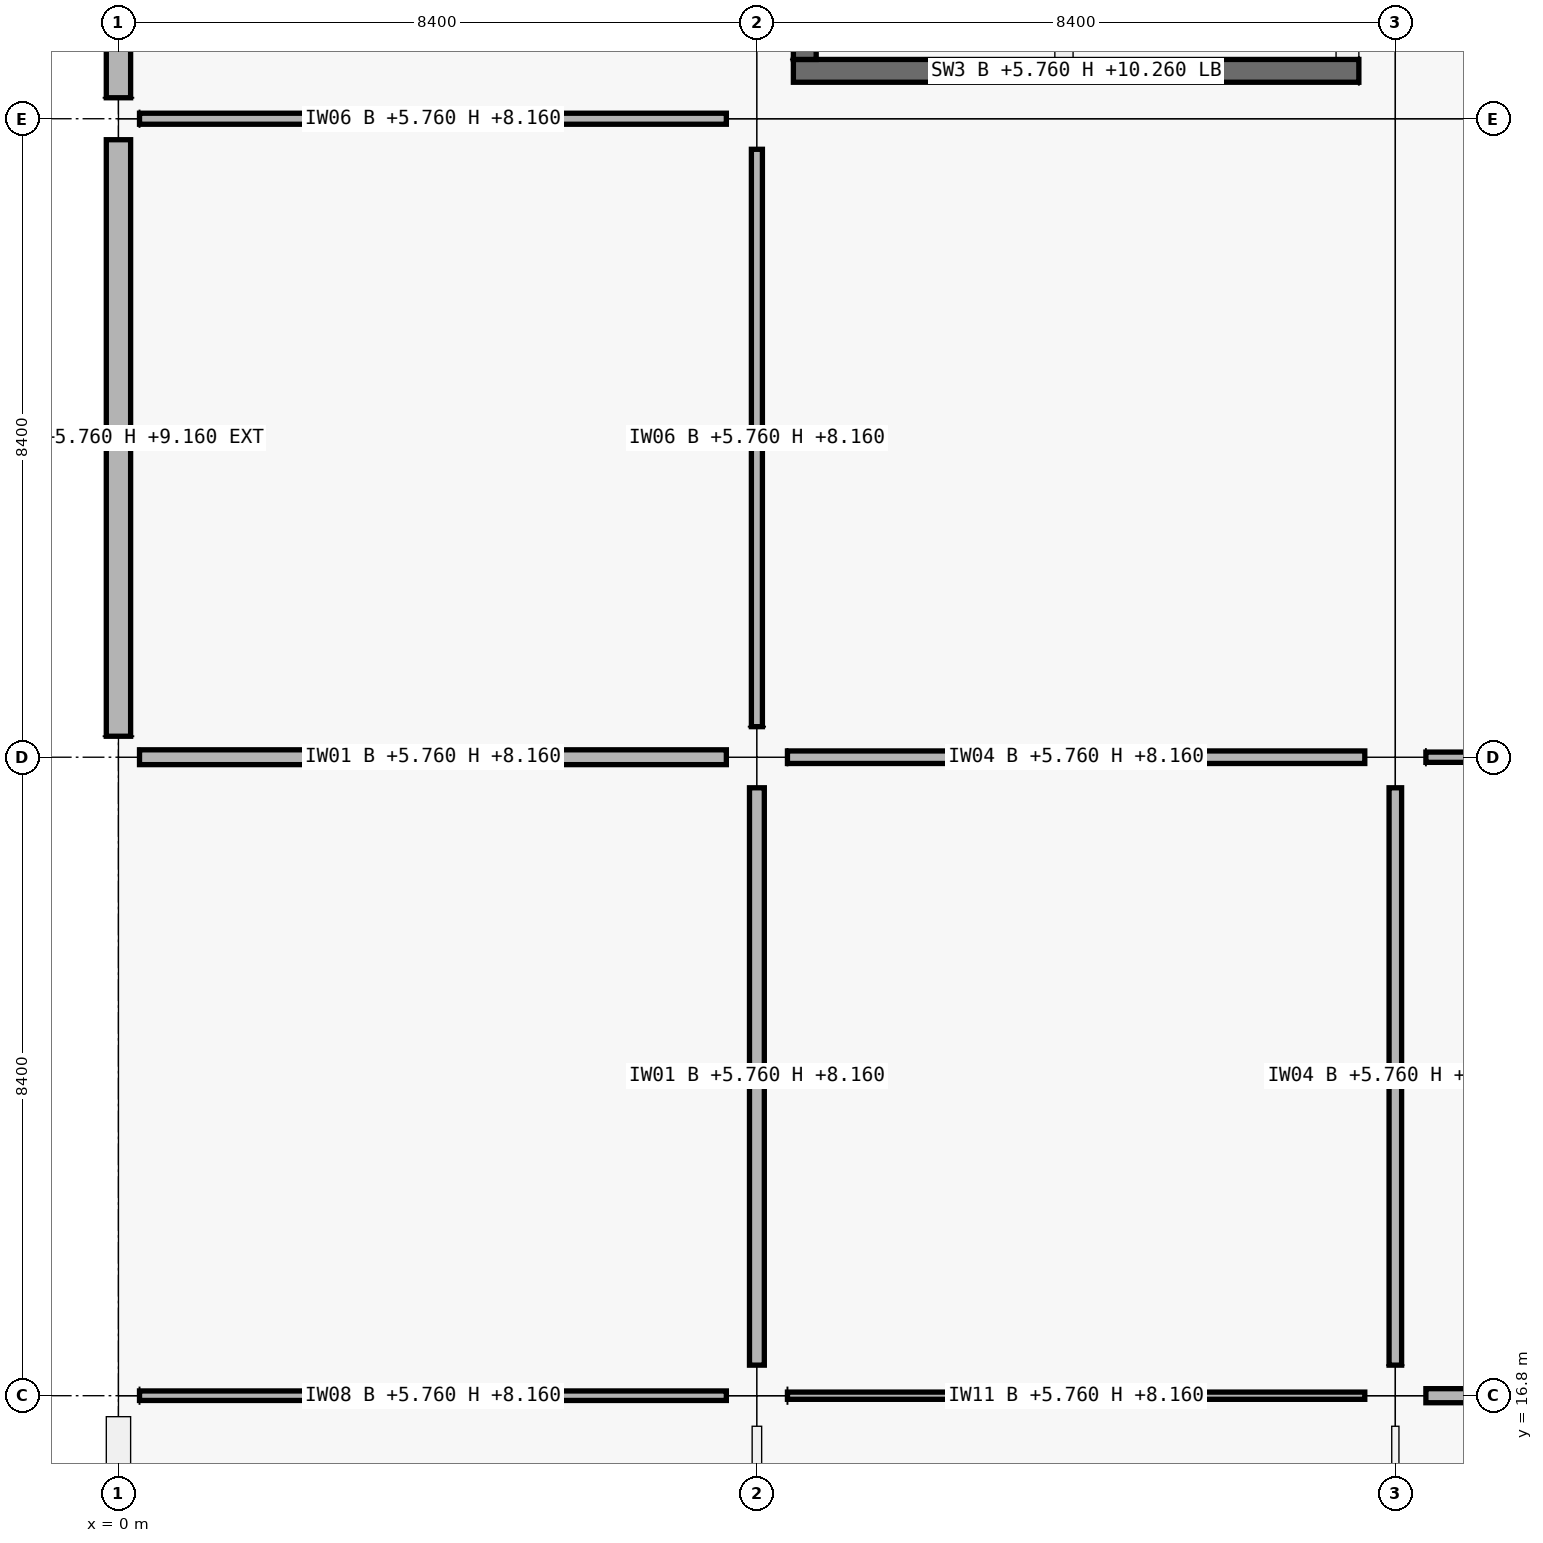
"""IFC4 building model, lengths in metres.
Left out: names, types, materials, properties, quantities, classifications, styles, units other than length and angle.
Written with IfcOpenShell. Run it as: python <this file> out.ifc"""

import sys

from ifc_helpers import new_model, si_unit, direction, frame, frame_2d, origin, origin_2d, place, context, subcontext, project, spatial, rectangle, extrude, element, fill, save


model = new_model("IFC4")
c1 = context("Model", 3, precision=1e-05, world=origin(), true_north=direction((0.0, 1.0)))
c2 = subcontext(c1, "Body", "Model", "MODEL_VIEW")
j1 = project(units=[si_unit("LENGTHUNIT", "METRE"), si_unit("PLANEANGLEUNIT", "RADIAN")], contexts=[c1])
p1 = place(None, origin())
s1 = spatial("IfcSite", under=j1, at=p1, CompositionType="ELEMENT")
p2 = place(p1, origin())
s2 = spatial("IfcBuilding", under=s1, at=p2, CompositionType="ELEMENT")
p3 = place(p2, frame((0.0, 0.0, 5.76)))
s3 = spatial("IfcBuildingStorey", under=s2, at=p3, CompositionType="ELEMENT", Elevation=5.76)
for number, where, z_axis, x_axis in (
    (1, (0.0, 16.8, 0.0), (0.0, 0.0, 1.0), (1.0, 0.0, 0.0)),
    (2, (0.0, 25.2, 0.0), (0.0, 0.0, 1.0), (1.0, 0.0, 0.0)),
    (3, (0.0, 33.6, 0.0), (0.0, 0.0, 1.0), (1.0, 0.0, 0.0)),
):
    element("IfcColumn", number, at=place(p3, frame(where, z_axis=z_axis, x_axis=x_axis)), inside=s3, PredefinedType="COLUMN", context=c2, shape_type="SweptSolid", body=[
        extrude(rectangle(XDim=0.55, YDim=0.55, at=origin_2d()), origin(), (0.0, 0.0, 1.0), 4.2),
    ])
for number, where, z_axis, x_axis in (
    (4, (8.4, 16.8, 0.0), (0.0, 0.0, 1.0), (1.0, 0.0, 0.0)),
    (5, (8.4, 25.2, 0.0), (0.0, 0.0, 1.0), (1.0, 0.0, 0.0)),
    (6, (8.4, 33.6, 0.0), (0.0, 0.0, 1.0), (1.0, 0.0, 0.0)),
    (7, (16.8, 16.8, 0.0), (0.0, 0.0, 1.0), (1.0, 0.0, 0.0)),
    (8, (16.8, 25.2, 0.0), (0.0, 0.0, 1.0), (1.0, 0.0, 0.0)),
    (9, (16.8, 33.6, 0.0), (0.0, 0.0, 1.0), (1.0, 0.0, 0.0)),
):
    element("IfcColumn", number, at=place(p3, frame(where, z_axis=z_axis, x_axis=x_axis)), inside=s3, PredefinedType="COLUMN", context=c2, shape_type="SweptSolid", body=[
        extrude(rectangle(XDim=0.8, YDim=0.8, at=origin_2d()), origin(), (0.0, 0.0, 1.0), 4.5),
    ])
p4 = place(p3, frame((0.0, 8.676, 0.0), z_axis=(0.0, 0.0, 1.0), x_axis=(0.0, 1.0, 0.0)))
e10 = element("IfcWall", 10, at=p4, inside=s3, PredefinedType="SOLIDWALL", context=c2, shape_type="SweptSolid", body=[
    extrude(rectangle(XDim=7.848, YDim=0.32, at=frame_2d((3.924, 0.0))), origin(), (0.0, 0.0, 1.0), 3.4),
])
p5 = place(p4, frame((2.974, 0.0, 0.9)))
e11 = element("IfcOpeningElement", 11, at=p5, cuts=e10, PredefinedType="OPENING", context=c2, shape_type="SweptSolid", body=[
    extrude(rectangle(XDim=1.9, YDim=1.75, at=frame_2d((0.95, 0.875))), frame((0.0, 0.16, 0.0), z_axis=(0.0, -1.0, 0.0), x_axis=(1.0, 0.0, 0.0)), (0.0, 0.0, 1.0), 0.32),
])
p6 = place(p3, frame((0.0, 25.476, 0.0), z_axis=(0.0, 0.0, 1.0), x_axis=(0.0, 1.0, 0.0)))
e12 = element("IfcWall", 12, at=p6, inside=s3, PredefinedType="SOLIDWALL", context=c2, shape_type="SweptSolid", body=[
    extrude(rectangle(XDim=7.848, YDim=0.32, at=frame_2d((3.924, 0.0))), origin(), (0.0, 0.0, 1.0), 3.4),
])
p7 = place(p6, frame((3.224, 0.0, 0.9)))
e13 = element("IfcOpeningElement", 13, at=p7, cuts=e12, PredefinedType="OPENING", context=c2, shape_type="SweptSolid", body=[
    extrude(rectangle(XDim=1.4, YDim=1.75, at=frame_2d((0.7, 0.875))), frame((0.0, 0.16, 0.0), z_axis=(0.0, -1.0, 0.0), x_axis=(1.0, 0.0, 0.0)), (0.0, 0.0, 1.0), 0.32),
])
p8 = place(p3, frame((0.0, 33.876, 0.0), z_axis=(0.0, 0.0, 1.0), x_axis=(0.0, 1.0, 0.0)))
e14 = element("IfcWall", 14, at=p8, inside=s3, PredefinedType="SOLIDWALL", context=c2, shape_type="SweptSolid", body=[
    extrude(rectangle(XDim=7.848, YDim=0.32, at=frame_2d((3.924, 0.0))), origin(), (0.0, 0.0, 1.0), 3.4),
])
p9 = place(p8, frame((2.324, 0.0, 0.9)))
e15 = element("IfcOpeningElement", 15, at=p9, cuts=e14, PredefinedType="OPENING", context=c2, shape_type="SweptSolid", body=[
    extrude(rectangle(XDim=3.2, YDim=1.75, at=frame_2d((1.6, 0.875))), frame((0.0, 0.16, 0.0), z_axis=(0.0, -1.0, 0.0), x_axis=(1.0, 0.0, 0.0)), (0.0, 0.0, 1.0), 0.32),
])
p10 = place(p3, frame((16.32, 34.23, 0.0), z_axis=(0.0, 0.0, 1.0), x_axis=(-1.0, 0.0, 0.0)))
e16 = element("IfcWall", 16, at=p10, inside=s3, PredefinedType="SHEAR", context=c2, shape_type="SweptSolid", body=[
    extrude(rectangle(XDim=7.44, YDim=0.3, at=frame_2d((3.72, 0.0))), origin(), (0.0, 0.0, 1.0), 4.5),
])
p11 = place(p10, frame((1.28, 0.0, 0.0)))
e17 = element("IfcOpeningElement", 17, at=p11, cuts=e16, PredefinedType="OPENING", context=c2, shape_type="SweptSolid", body=[
    extrude(rectangle(XDim=1.5, YDim=2.15, at=frame_2d((0.75, 1.075))), frame((0.0, 0.15, 0.0), z_axis=(0.0, -1.0, 0.0), x_axis=(1.0, 0.0, 0.0)), (0.0, 0.0, 1.0), 0.3),
])
for number, where, z_axis, x_axis in (
    (18, (9.03, 34.38, 0.0), (0.0, 0.0, 1.0), (0.0, 1.0, 0.0)),
    (19, (16.17, 41.22, 0.0), (0.0, 0.0, 1.0), (0.0, -1.0, 0.0)),
):
    element("IfcWall", number, at=place(p3, frame(where, z_axis=z_axis, x_axis=x_axis)), inside=s3, PredefinedType="SHEAR", context=c2, shape_type="SweptSolid", body=[
        extrude(rectangle(XDim=6.84, YDim=0.3, at=frame_2d((3.42, 0.0))), origin(), (0.0, 0.0, 1.0), 4.5),
    ])
p12 = place(p3, frame((12.44, 34.38, 0.0), z_axis=(0.0, 0.0, 1.0), x_axis=(0.0, 1.0, 0.0)))
e20 = element("IfcWall", 20, at=p12, inside=s3, PredefinedType="SHEAR", context=c2, shape_type="SweptSolid", body=[
    extrude(rectangle(XDim=6.84, YDim=0.24, at=frame_2d((3.42, 0.0))), origin(), (0.0, 0.0, 1.0), 4.5),
])
p13 = place(p12, frame((0.12, 0.0, 0.0)))
e21 = element("IfcOpeningElement", 21, at=p13, cuts=e20, PredefinedType="OPENING", context=c2, shape_type="SweptSolid", body=[
    extrude(rectangle(XDim=1.0, YDim=2.15, at=frame_2d((0.5, 1.075))), frame((0.0, 0.12, 0.0), z_axis=(0.0, -1.0, 0.0), x_axis=(1.0, 0.0, 0.0)), (0.0, 0.0, 1.0), 0.24),
])
p14 = place(p3, frame((0.277, 16.8, 0.0), z_axis=(0.0, 0.0, 1.0), x_axis=(1.0, 0.0, 0.0)))
e22 = element("IfcWall", 22, at=p14, inside=s3, PredefinedType="PARTITIONING", context=c2, shape_type="SweptSolid", body=[
    extrude(rectangle(XDim=7.721, YDim=0.125, at=frame_2d((3.86, 0.0))), origin(), (0.0, 0.0, 1.0), 2.4),
])
p15 = place(p14, frame((3.33, 0.0, 0.0)))
e23 = element("IfcOpeningElement", 23, at=p15, cuts=e22, PredefinedType="OPENING", context=c2, shape_type="SweptSolid", body=[
    extrude(rectangle(XDim=1.06, YDim=2.22, at=frame_2d((0.53, 1.11))), frame((0.0, 0.062, 0.0), z_axis=(0.0, -1.0, 0.0), x_axis=(1.0, 0.0, 0.0)), (0.0, 0.0, 1.0), 0.125),
])
p16 = place(p3, frame((0.277, 25.2, 0.0), z_axis=(0.0, 0.0, 1.0), x_axis=(1.0, 0.0, 0.0)))
e24 = element("IfcWall", 24, at=p16, inside=s3, PredefinedType="PARTITIONING", context=c2, shape_type="SweptSolid", body=[
    extrude(rectangle(XDim=7.721, YDim=0.195, at=frame_2d((3.86, 0.0))), origin(), (0.0, 0.0, 1.0), 2.4),
])
p17 = place(p16, frame((3.396, 0.0, 0.0)))
e25 = element("IfcOpeningElement", 25, at=p17, cuts=e24, PredefinedType="OPENING", context=c2, shape_type="SweptSolid", body=[
    extrude(rectangle(XDim=0.93, YDim=2.12, at=frame_2d((0.465, 1.06))), frame((0.0, 0.098, 0.0), z_axis=(0.0, -1.0, 0.0), x_axis=(1.0, 0.0, 0.0)), (0.0, 0.0, 1.0), 0.195),
])
p18 = place(p3, frame((0.277, 33.6, 0.0), z_axis=(0.0, 0.0, 1.0), x_axis=(1.0, 0.0, 0.0)))
e26 = element("IfcWall", 26, at=p18, inside=s3, PredefinedType="PARTITIONING", context=c2, shape_type="SweptSolid", body=[
    extrude(rectangle(XDim=7.721, YDim=0.145, at=frame_2d((3.86, 0.0))), origin(), (0.0, 0.0, 1.0), 2.4),
])
p19 = place(p18, frame((3.341, 0.0, 0.0)))
e27 = element("IfcOpeningElement", 27, at=p19, cuts=e26, PredefinedType="OPENING", context=c2, shape_type="SweptSolid", body=[
    extrude(rectangle(XDim=1.04, YDim=2.2, at=frame_2d((0.52, 1.1))), frame((0.0, 0.073, 0.0), z_axis=(0.0, -1.0, 0.0), x_axis=(1.0, 0.0, 0.0)), (0.0, 0.0, 1.0), 0.145),
])
p20 = place(p3, frame((8.802, 16.8, 0.0), z_axis=(0.0, 0.0, 1.0), x_axis=(1.0, 0.0, 0.0)))
e28 = element("IfcWall", 28, at=p20, inside=s3, PredefinedType="PARTITIONING", context=c2, shape_type="SweptSolid", body=[
    extrude(rectangle(XDim=7.596, YDim=0.095, at=frame_2d((3.798, 0.0))), origin(), (0.0, 0.0, 1.0), 2.4),
])
p21 = place(p20, frame((3.258, 0.0, 0.0)))
e29 = element("IfcOpeningElement", 29, at=p21, cuts=e28, PredefinedType="OPENING", context=c2, shape_type="SweptSolid", body=[
    extrude(rectangle(XDim=1.08, YDim=2.22, at=frame_2d((0.54, 1.11))), frame((0.0, 0.047, 0.0), z_axis=(0.0, -1.0, 0.0), x_axis=(1.0, 0.0, 0.0)), (0.0, 0.0, 1.0), 0.095),
])
p22 = place(p3, frame((8.802, 25.2, 0.0), z_axis=(0.0, 0.0, 1.0), x_axis=(1.0, 0.0, 0.0)))
e30 = element("IfcWall", 30, at=p22, inside=s3, PredefinedType="PARTITIONING", context=c2, shape_type="SweptSolid", body=[
    extrude(rectangle(XDim=7.596, YDim=0.165, at=frame_2d((3.798, 0.0))), origin(), (0.0, 0.0, 1.0), 2.4),
])
p23 = place(p22, frame((3.318, 0.0, 0.0)))
e31 = element("IfcOpeningElement", 31, at=p23, cuts=e30, PredefinedType="OPENING", context=c2, shape_type="SweptSolid", body=[
    extrude(rectangle(XDim=0.96, YDim=2.18, at=frame_2d((0.48, 1.09))), frame((0.0, 0.083, 0.0), z_axis=(0.0, -1.0, 0.0), x_axis=(1.0, 0.0, 0.0)), (0.0, 0.0, 1.0), 0.165),
])
p24 = place(p3, frame((17.202, 16.8, 0.0), z_axis=(0.0, 0.0, 1.0), x_axis=(1.0, 0.0, 0.0)))
e32 = element("IfcWall", 32, at=p24, inside=s3, PredefinedType="PARTITIONING", context=c2, shape_type="SweptSolid", body=[
    extrude(rectangle(XDim=7.596, YDim=0.185, at=frame_2d((3.798, 0.0))), origin(), (0.0, 0.0, 1.0), 2.4),
])
p25 = place(p24, frame((3.268, 0.0, 0.0)))
e33 = element("IfcOpeningElement", 33, at=p25, cuts=e32, PredefinedType="OPENING", context=c2, shape_type="SweptSolid", body=[
    extrude(rectangle(XDim=1.06, YDim=2.22, at=frame_2d((0.53, 1.11))), frame((0.0, 0.093, 0.0), z_axis=(0.0, -1.0, 0.0), x_axis=(1.0, 0.0, 0.0)), (0.0, 0.0, 1.0), 0.185),
])
p26 = place(p3, frame((17.202, 25.2, 0.0), z_axis=(0.0, 0.0, 1.0), x_axis=(1.0, 0.0, 0.0)))
e34 = element("IfcWall", 34, at=p26, inside=s3, PredefinedType="PARTITIONING", context=c2, shape_type="SweptSolid", body=[
    extrude(rectangle(XDim=7.596, YDim=0.135, at=frame_2d((3.798, 0.0))), origin(), (0.0, 0.0, 1.0), 2.4),
])
p27 = place(p26, frame((3.338, 0.0, 0.0)))
e35 = element("IfcOpeningElement", 35, at=p27, cuts=e34, PredefinedType="OPENING", context=c2, shape_type="SweptSolid", body=[
    extrude(rectangle(XDim=0.92, YDim=2.15, at=frame_2d((0.46, 1.075))), frame((0.0, 0.067, 0.0), z_axis=(0.0, -1.0, 0.0), x_axis=(1.0, 0.0, 0.0)), (0.0, 0.0, 1.0), 0.135),
])
p28 = place(p3, frame((8.4, 8.727, 0.0), z_axis=(0.0, 0.0, 1.0), x_axis=(0.0, 1.0, 0.0)))
e36 = element("IfcWall", 36, at=p28, inside=s3, PredefinedType="PARTITIONING", context=c2, shape_type="SweptSolid", body=[
    extrude(rectangle(XDim=7.671, YDim=0.125, at=frame_2d((3.835, 0.0))), origin(), (0.0, 0.0, 1.0), 2.4),
])
p29 = place(p28, frame((3.336, 0.0, 0.0)))
e37 = element("IfcOpeningElement", 37, at=p29, cuts=e36, PredefinedType="OPENING", context=c2, shape_type="SweptSolid", body=[
    extrude(rectangle(XDim=1.0, YDim=2.2, at=frame_2d((0.5, 1.1))), frame((0.0, 0.062, 0.0), z_axis=(0.0, -1.0, 0.0), x_axis=(1.0, 0.0, 0.0)), (0.0, 0.0, 1.0), 0.125),
])
p30 = place(p3, frame((8.4, 17.202, 0.0), z_axis=(0.0, 0.0, 1.0), x_axis=(0.0, 1.0, 0.0)))
e38 = element("IfcWall", 38, at=p30, inside=s3, PredefinedType="PARTITIONING", context=c2, shape_type="SweptSolid", body=[
    extrude(rectangle(XDim=7.596, YDim=0.195, at=frame_2d((3.798, 0.0))), origin(), (0.0, 0.0, 1.0), 2.4),
])
p31 = place(p30, frame((3.308, 0.0, 0.0)))
e39 = element("IfcOpeningElement", 39, at=p31, cuts=e38, PredefinedType="OPENING", context=c2, shape_type="SweptSolid", body=[
    extrude(rectangle(XDim=0.98, YDim=2.18, at=frame_2d((0.49, 1.09))), frame((0.0, 0.098, 0.0), z_axis=(0.0, -1.0, 0.0), x_axis=(1.0, 0.0, 0.0)), (0.0, 0.0, 1.0), 0.195),
])
p32 = place(p3, frame((8.4, 25.602, 0.0), z_axis=(0.0, 0.0, 1.0), x_axis=(0.0, 1.0, 0.0)))
e40 = element("IfcWall", 40, at=p32, inside=s3, PredefinedType="PARTITIONING", context=c2, shape_type="SweptSolid", body=[
    extrude(rectangle(XDim=7.596, YDim=0.145, at=frame_2d((3.798, 0.0))), origin(), (0.0, 0.0, 1.0), 2.4),
])
p33 = place(p32, frame((3.313, 0.0, 0.0)))
e41 = element("IfcOpeningElement", 41, at=p33, cuts=e40, PredefinedType="OPENING", context=c2, shape_type="SweptSolid", body=[
    extrude(rectangle(XDim=0.97, YDim=2.12, at=frame_2d((0.485, 1.06))), frame((0.0, 0.073, 0.0), z_axis=(0.0, -1.0, 0.0), x_axis=(1.0, 0.0, 0.0)), (0.0, 0.0, 1.0), 0.145),
])
p34 = place(p3, frame((16.8, 8.702, 0.0), z_axis=(0.0, 0.0, 1.0), x_axis=(0.0, 1.0, 0.0)))
e42 = element("IfcWall", 42, at=p34, inside=s3, PredefinedType="PARTITIONING", context=c2, shape_type="SweptSolid", body=[
    extrude(rectangle(XDim=7.696, YDim=0.095, at=frame_2d((3.848, 0.0))), origin(), (0.0, 0.0, 1.0), 2.4),
])
p35 = place(p34, frame((3.323, 0.0, 0.0)))
e43 = element("IfcOpeningElement", 43, at=p35, cuts=e42, PredefinedType="OPENING", context=c2, shape_type="SweptSolid", body=[
    extrude(rectangle(XDim=1.05, YDim=2.12, at=frame_2d((0.525, 1.06))), frame((0.0, 0.047, 0.0), z_axis=(0.0, -1.0, 0.0), x_axis=(1.0, 0.0, 0.0)), (0.0, 0.0, 1.0), 0.095),
])
p36 = place(p3, frame((16.8, 17.202, 0.0), z_axis=(0.0, 0.0, 1.0), x_axis=(0.0, 1.0, 0.0)))
e44 = element("IfcWall", 44, at=p36, inside=s3, PredefinedType="PARTITIONING", context=c2, shape_type="SweptSolid", body=[
    extrude(rectangle(XDim=7.596, YDim=0.165, at=frame_2d((3.798, 0.0))), origin(), (0.0, 0.0, 1.0), 2.4),
])
p37 = place(p36, frame((3.293, 0.0, 0.0)))
e45 = element("IfcOpeningElement", 45, at=p37, cuts=e44, PredefinedType="OPENING", context=c2, shape_type="SweptSolid", body=[
    extrude(rectangle(XDim=1.01, YDim=2.12, at=frame_2d((0.505, 1.06))), frame((0.0, 0.083, 0.0), z_axis=(0.0, -1.0, 0.0), x_axis=(1.0, 0.0, 0.0)), (0.0, 0.0, 1.0), 0.165),
])
p38 = place(p7, origin())
e46 = element("IfcWindow", 46, at=p38, inside=s3, PartitioningType="SINGLE_PANEL", PredefinedType="WINDOW", context=c2, shape_type="SweptSolid", body=[
    extrude(rectangle(XDim=1.4, YDim=1.75, at=frame_2d((0.7, 0.875))), frame((0.0, 0.03, 0.0), z_axis=(0.0, -1.0, 0.0), x_axis=(1.0, 0.0, 0.0)), (0.0, 0.0, 1.0), 0.06),
])
fill(e13, e46)
p39 = place(p11, origin())
e47 = element("IfcDoor", 47, at=p39, inside=s3, OperationType="DOUBLE_DOOR_SINGLE_SWING", PredefinedType="DOOR", context=c2, shape_type="SweptSolid", body=[
    extrude(rectangle(XDim=1.5, YDim=2.15, at=frame_2d((0.75, 1.075))), frame((0.0, 0.025, 0.0), z_axis=(0.0, -1.0, 0.0), x_axis=(1.0, 0.0, 0.0)), (0.0, 0.0, 1.0), 0.05),
])
fill(e17, e47)
p40 = place(p23, origin())
e48 = element("IfcDoor", 48, at=p40, inside=s3, OperationType="SINGLE_SWING_RIGHT", PredefinedType="DOOR", context=c2, shape_type="SweptSolid", body=[
    extrude(rectangle(XDim=0.96, YDim=2.18, at=frame_2d((0.48, 1.09))), frame((0.0, 0.025, 0.0), z_axis=(0.0, -1.0, 0.0), x_axis=(1.0, 0.0, 0.0)), (0.0, 0.0, 1.0), 0.05),
])
fill(e31, e48)
p41 = place(p33, origin())
e49 = element("IfcDoor", 49, at=p41, inside=s3, OperationType="SINGLE_SWING_RIGHT", PredefinedType="DOOR", context=c2, shape_type="SweptSolid", body=[
    extrude(rectangle(XDim=0.97, YDim=2.12, at=frame_2d((0.485, 1.06))), frame((0.0, 0.025, 0.0), z_axis=(0.0, -1.0, 0.0), x_axis=(1.0, 0.0, 0.0)), (0.0, 0.0, 1.0), 0.05),
])
fill(e41, e49)
p42 = place(p15, origin())
e50 = element("IfcDoor", 50, at=p42, inside=s3, OperationType="SINGLE_SWING_RIGHT", PredefinedType="DOOR", context=c2, shape_type="SweptSolid", body=[
    extrude(rectangle(XDim=1.06, YDim=2.22, at=frame_2d((0.53, 1.11))), frame((0.0, 0.025, 0.0), z_axis=(0.0, -1.0, 0.0), x_axis=(1.0, 0.0, 0.0)), (0.0, 0.0, 1.0), 0.05),
])
fill(e23, e50)
p43 = place(p19, origin())
e51 = element("IfcDoor", 51, at=p43, inside=s3, OperationType="SINGLE_SWING_LEFT", PredefinedType="DOOR", context=c2, shape_type="SweptSolid", body=[
    extrude(rectangle(XDim=1.04, YDim=2.2, at=frame_2d((0.52, 1.1))), frame((0.0, 0.025, 0.0), z_axis=(0.0, -1.0, 0.0), x_axis=(1.0, 0.0, 0.0)), (0.0, 0.0, 1.0), 0.05),
])
fill(e27, e51)
p44 = place(p17, origin())
e52 = element("IfcDoor", 52, at=p44, inside=s3, OperationType="SINGLE_SWING_LEFT", PredefinedType="DOOR", context=c2, shape_type="SweptSolid", body=[
    extrude(rectangle(XDim=0.93, YDim=2.12, at=frame_2d((0.465, 1.06))), frame((0.0, 0.025, 0.0), z_axis=(0.0, -1.0, 0.0), x_axis=(1.0, 0.0, 0.0)), (0.0, 0.0, 1.0), 0.05),
])
fill(e25, e52)
p45 = place(p21, origin())
e53 = element("IfcDoor", 53, at=p45, inside=s3, OperationType="SINGLE_SWING_RIGHT", PredefinedType="DOOR", context=c2, shape_type="SweptSolid", body=[
    extrude(rectangle(XDim=1.08, YDim=2.22, at=frame_2d((0.54, 1.11))), frame((0.0, 0.025, 0.0), z_axis=(0.0, -1.0, 0.0), x_axis=(1.0, 0.0, 0.0)), (0.0, 0.0, 1.0), 0.05),
])
fill(e29, e53)
p46 = place(p31, origin())
e54 = element("IfcDoor", 54, at=p46, inside=s3, OperationType="SINGLE_SWING_RIGHT", PredefinedType="DOOR", context=c2, shape_type="SweptSolid", body=[
    extrude(rectangle(XDim=0.98, YDim=2.18, at=frame_2d((0.49, 1.09))), frame((0.0, 0.025, 0.0), z_axis=(0.0, -1.0, 0.0), x_axis=(1.0, 0.0, 0.0)), (0.0, 0.0, 1.0), 0.05),
])
fill(e39, e54)
p47 = place(p37, origin())
e55 = element("IfcDoor", 55, at=p47, inside=s3, OperationType="SINGLE_SWING_LEFT", PredefinedType="DOOR", context=c2, shape_type="SweptSolid", body=[
    extrude(rectangle(XDim=1.01, YDim=2.12, at=frame_2d((0.505, 1.06))), frame((0.0, 0.025, 0.0), z_axis=(0.0, -1.0, 0.0), x_axis=(1.0, 0.0, 0.0)), (0.0, 0.0, 1.0), 0.05),
])
fill(e45, e55)
save(model, sys.argv[1])
